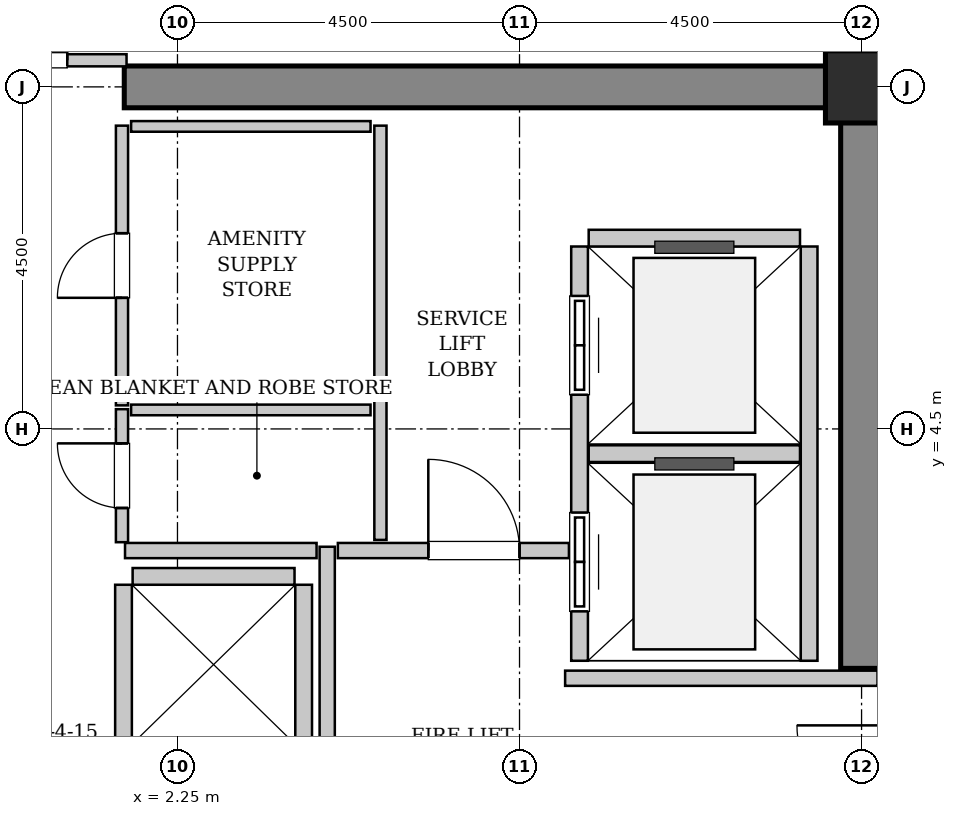
"""IFC4 building model, lengths in metres.
Left out: names, types, materials, properties, quantities, classifications, styles, units other than length and angle.
Written with IfcOpenShell. Run it as: python <this file> out.ifc"""

import sys

from ifc_helpers import new_model, si_unit, direction, frame, frame_2d, origin, origin_2d, place, context, subcontext, project, spatial, rectangle, hollow_rectangle, extrude, source, transform, mapped, element, fill, save


model = new_model("IFC4")
c1 = context("Model", 3, precision=1e-05, world=origin(), true_north=direction((0.0, 1.0)))
c2 = subcontext(c1, "Body", "Model", "MODEL_VIEW")
j1 = project(units=[si_unit("LENGTHUNIT", "METRE"), si_unit("PLANEANGLEUNIT", "RADIAN")], contexts=[c1])
p1 = place(None, origin())
s1 = spatial("IfcSite", under=j1, at=p1, CompositionType="ELEMENT")
p2 = place(p1, origin())
s2 = spatial("IfcBuilding", under=s1, at=p2, CompositionType="ELEMENT")
p3 = place(p2, frame((0.0, 0.0, 167.8)))
s3 = spatial("IfcBuildingStorey", under=s2, at=p3, CompositionType="ELEMENT", Elevation=167.8)
m1 = source(origin(), c2, "Body", "SweptSolid", [
    extrude(rectangle(XDim=9.975, YDim=0.55, at=frame_2d((4.987, 0.0))), origin(), (0.0, 0.0, 1.0), 3.8),
])
p4 = place(p3, frame((1.55, 9.0, 0.0), z_axis=(0.0, 0.0, 1.0), x_axis=(1.0, 0.0, 0.0)))
e1 = element("IfcWall", 1, at=p4, inside=s3, PredefinedType="SHEAR", context=c2, shape_type="MappedRepresentation", body=[
    mapped(m1, transform((0.0, 0.0, 0.0), x_axis=(1.0, 0.0, 0.0), y_axis=(0.0, 1.0, 0.0), z_axis=(0.0, 0.0, 1.0), scale=1.0)),
])
m2 = source(origin(), c2, "Body", "SweptSolid", [
    extrude(rectangle(XDim=7.375, YDim=0.55, at=frame_2d((3.688, 0.0))), origin(), (0.0, 0.0, 1.0), 3.8),
])
p5 = place(p3, frame((11.25, 1.35, 0.0), z_axis=(0.0, 0.0, 1.0), x_axis=(0.0, 1.0, 0.0)))
e2 = element("IfcWall", 2, at=p5, inside=s3, PredefinedType="SHEAR", context=c2, shape_type="MappedRepresentation", body=[
    mapped(m2, transform((0.0, 0.0, 0.0), x_axis=(1.0, 0.0, 0.0), y_axis=(0.0, 1.0, 0.0), z_axis=(0.0, 0.0, 1.0), scale=1.0)),
])
m3 = source(origin(), c2, "Body", "SweptSolid", [
    extrude(hollow_rectangle(XDim=0.95, YDim=0.95, WallThickness=0.045, InnerFilletRadius=0.045, OuterFilletRadius=0.09, at=origin_2d()), origin(), (0.0, 0.0, 1.0), 3.8),
])
p6 = place(p3, frame((11.25, 9.0, 0.0), z_axis=(0.0, 0.0, 1.0), x_axis=(1.0, 0.0, 0.0)))
e3 = element("IfcColumn", 3, at=p6, inside=s3, PredefinedType="COLUMN", context=c2, shape_type="MappedRepresentation", body=[
    mapped(m3, transform((0.0, 0.0, 0.0), x_axis=(1.0, 0.0, 0.0), y_axis=(0.0, 1.0, 0.0), z_axis=(0.0, 0.0, 1.0), scale=1.0)),
])
m4 = source(origin(), c2, "Body", "SweptSolid", [
    extrude(rectangle(XDim=5.45, YDim=0.22, at=frame_2d((2.725, 0.0))), origin(), (0.0, 0.0, 1.0), 3.535),
])
p7 = place(p3, frame((7.54, 6.9, 0.0), z_axis=(0.0, 0.0, 1.0), x_axis=(0.0, -1.0, 0.0)))
e4 = element("IfcWall", 4, at=p7, inside=s3, PredefinedType="SOLIDWALL", context=c2, shape_type="MappedRepresentation", body=[
    mapped(m4, transform((0.0, 0.0, 0.0), x_axis=(1.0, 0.0, 0.0), y_axis=(0.0, 1.0, 0.0), z_axis=(0.0, 0.0, 1.0), scale=1.0)),
])
p8 = place(p7, frame((3.5, 0.0, 0.0)))
e5 = element("IfcOpeningElement", 5, at=p8, cuts=e4, PredefinedType="OPENING", context=c2, shape_type="SweptSolid", body=[
    extrude(rectangle(XDim=1.3, YDim=2.3, at=frame_2d((0.65, 1.15))), frame((0.0, 0.12, 0.0), z_axis=(0.0, -1.0, 0.0), x_axis=(1.0, 0.0, 0.0)), (0.0, 0.0, 1.0), 0.24),
])
p9 = place(p7, frame((0.65, 0.0, 0.0)))
e6 = element("IfcOpeningElement", 6, at=p9, cuts=e4, PredefinedType="OPENING", context=c2, shape_type="SweptSolid", body=[
    extrude(rectangle(XDim=1.3, YDim=2.3, at=frame_2d((0.65, 1.15))), frame((0.0, 0.12, 0.0), z_axis=(0.0, -1.0, 0.0), x_axis=(1.0, 0.0, 0.0)), (0.0, 0.0, 1.0), 0.24),
])
p10 = place(p3, frame((10.56, 1.45, 0.0), z_axis=(0.0, 0.0, 1.0), x_axis=(0.0, 1.0, 0.0)))
e7 = element("IfcWall", 7, at=p10, inside=s3, PredefinedType="SOLIDWALL", context=c2, shape_type="MappedRepresentation", body=[
    mapped(m4, transform((0.0, 0.0, 0.0), x_axis=(1.0, 0.0, 0.0), y_axis=(0.0, 1.0, 0.0), z_axis=(0.0, 0.0, 1.0), scale=1.0)),
])
m5 = source(origin(), c2, "Body", "SweptSolid", [
    extrude(rectangle(XDim=2.78, YDim=0.22, at=frame_2d((1.39, 0.0))), origin(), (0.0, 0.0, 1.0), 3.535),
])
for number, where, z_axis, x_axis in (
    (8, (7.66, 4.175, 0.0), (0.0, 0.0, 1.0), (1.0, 0.0, 0.0)),
    (9, (10.44, 7.01, 0.0), (0.0, 0.0, 1.0), (-1.0, 0.0, 0.0)),
):
    element("IfcWall", number, at=place(p3, frame(where, z_axis=z_axis, x_axis=x_axis)), inside=s3, PredefinedType="SOLIDWALL", context=c2, shape_type="MappedRepresentation", body=[
        mapped(m5, transform((0.0, 0.0, 0.0), x_axis=(1.0, 0.0, 0.0), y_axis=(0.0, 1.0, 0.0), z_axis=(0.0, 0.0, 1.0), scale=1.0)),
    ])
m6 = source(origin(), c2, "Body", "SweptSolid", [
    extrude(rectangle(XDim=4.9, YDim=0.22, at=frame_2d((2.45, 0.0))), origin(), (0.0, 0.0, 1.0), 3.535),
])
for number, where, z_axis, x_axis in (
    (10, (1.54, 2.45, 0.0), (0.0, 0.0, 1.0), (0.0, -1.0, 0.0)),
    (11, (3.91, -2.45, 0.0), (0.0, 0.0, 1.0), (0.0, 1.0, 0.0)),
):
    element("IfcWall", number, at=place(p3, frame(where, z_axis=z_axis, x_axis=x_axis)), inside=s3, PredefinedType="SOLIDWALL", context=c2, shape_type="MappedRepresentation", body=[
        mapped(m6, transform((0.0, 0.0, 0.0), x_axis=(1.0, 0.0, 0.0), y_axis=(0.0, 1.0, 0.0), z_axis=(0.0, 0.0, 1.0), scale=1.0)),
    ])
m7 = source(origin(), c2, "Body", "SweptSolid", [
    extrude(rectangle(XDim=2.13, YDim=0.22, at=frame_2d((1.065, 0.0))), origin(), (0.0, 0.0, 1.0), 3.535),
])
p11 = place(p3, frame((3.79, 2.56, 0.0), z_axis=(0.0, 0.0, 1.0), x_axis=(-1.0, 0.0, 0.0)))
e12 = element("IfcWall", 12, at=p11, inside=s3, PredefinedType="SOLIDWALL", context=c2, shape_type="MappedRepresentation", body=[
    mapped(m7, transform((0.0, 0.0, 0.0), x_axis=(1.0, 0.0, 0.0), y_axis=(0.0, 1.0, 0.0), z_axis=(0.0, 0.0, 1.0), scale=1.0)),
])
m8 = source(origin(), c2, "Body", "SweptSolid", [
    extrude(rectangle(XDim=5.9, YDim=0.2, at=frame_2d((2.95, 0.0))), origin(), (0.0, 0.0, 1.0), 3.535),
])
p12 = place(p3, frame((4.22, -2.95, 0.0), z_axis=(0.0, 0.0, 1.0), x_axis=(0.0, 1.0, 0.0)))
e13 = element("IfcWall", 13, at=p12, inside=s3, PredefinedType="PARTITIONING", context=c2, shape_type="MappedRepresentation", body=[
    mapped(m8, transform((0.0, 0.0, 0.0), x_axis=(1.0, 0.0, 0.0), y_axis=(0.0, 1.0, 0.0), z_axis=(0.0, 0.0, 1.0), scale=1.0)),
])
m9 = source(origin(), c2, "Body", "SweptSolid", [
    extrude(rectangle(XDim=2.52, YDim=0.2, at=frame_2d((1.26, 0.0))), origin(), (0.0, 0.0, 1.0), 3.535),
])
p13 = place(p3, frame((1.56, 2.9, 0.0), z_axis=(0.0, 0.0, 1.0), x_axis=(1.0, 0.0, 0.0)))
e14 = element("IfcWall", 14, at=p13, inside=s3, PredefinedType="PARTITIONING", context=c2, shape_type="MappedRepresentation", body=[
    mapped(m9, transform((0.0, 0.0, 0.0), x_axis=(1.0, 0.0, 0.0), y_axis=(0.0, 1.0, 0.0), z_axis=(0.0, 0.0, 1.0), scale=1.0)),
])
m10 = source(origin(), c2, "Body", "SweptSolid", [
    extrude(rectangle(XDim=3.04, YDim=0.2, at=frame_2d((1.52, 0.0))), origin(), (0.0, 0.0, 1.0), 3.535),
])
p14 = place(p3, frame((4.36, 2.9, 0.0), z_axis=(0.0, 0.0, 1.0), x_axis=(1.0, 0.0, 0.0)))
e15 = element("IfcWall", 15, at=p14, inside=s3, PredefinedType="PARTITIONING", context=c2, shape_type="MappedRepresentation", body=[
    mapped(m10, transform((0.0, 0.0, 0.0), x_axis=(1.0, 0.0, 0.0), y_axis=(0.0, 1.0, 0.0), z_axis=(0.0, 0.0, 1.0), scale=1.0)),
])
p15 = place(p14, frame((1.19, 0.0, 0.0)))
e16 = element("IfcOpeningElement", 16, at=p15, cuts=e15, PredefinedType="OPENING", context=c2, shape_type="SweptSolid", body=[
    extrude(rectangle(XDim=1.2, YDim=2.15, at=frame_2d((0.6, 1.075))), frame((0.0, 0.11, 0.0), z_axis=(0.0, -1.0, 0.0), x_axis=(1.0, 0.0, 0.0)), (0.0, 0.0, 1.0), 0.22),
])
m11 = source(origin(), c2, "Body", "SweptSolid", [
    extrude(rectangle(XDim=4.11, YDim=0.2, at=frame_2d((2.055, 0.0))), origin(), (0.0, 0.0, 1.0), 3.535),
])
p16 = place(p3, frame((7.35, 1.22, 0.0), z_axis=(0.0, 0.0, 1.0), x_axis=(1.0, 0.0, 0.0)))
e17 = element("IfcWall", 17, at=p16, inside=s3, PredefinedType="PARTITIONING", context=c2, shape_type="MappedRepresentation", body=[
    mapped(m11, transform((0.0, 0.0, 0.0), x_axis=(1.0, 0.0, 0.0), y_axis=(0.0, 1.0, 0.0), z_axis=(0.0, 0.0, 1.0), scale=1.0)),
])
m12 = source(origin(), c2, "Body", "SweptSolid", [
    extrude(rectangle(XDim=3.16, YDim=0.16, at=frame_2d((1.58, 0.0))), origin(), (0.0, 0.0, 1.0), 2.425),
])
p17 = place(p3, frame((-1.58, 9.35, 0.0), z_axis=(0.0, 0.0, 1.0), x_axis=(1.0, 0.0, 0.0)))
e18 = element("IfcWall", 18, at=p17, inside=s3, PredefinedType="PARTITIONING", context=c2, shape_type="MappedRepresentation", body=[
    mapped(m12, transform((0.0, 0.0, 0.0), x_axis=(1.0, 0.0, 0.0), y_axis=(0.0, 1.0, 0.0), z_axis=(0.0, 0.0, 1.0), scale=1.0)),
])
p18 = place(p17, frame((0.78, 0.0, 0.0)))
e19 = element("IfcOpeningElement", 19, at=p18, cuts=e18, PredefinedType="OPENING", context=c2, shape_type="SweptSolid", body=[
    extrude(rectangle(XDim=1.6, YDim=2.3, at=frame_2d((0.8, 1.15))), frame((0.0, 0.09, 0.0), z_axis=(0.0, -1.0, 0.0), x_axis=(1.0, 0.0, 0.0)), (0.0, 0.0, 1.0), 0.18),
])
m13 = source(origin(), c2, "Body", "SweptSolid", [
    extrude(rectangle(XDim=5.45, YDim=0.16, at=frame_2d((2.725, 0.0))), origin(), (0.0, 0.0, 1.0), 3.535),
])
p19 = place(p3, frame((4.92, 3.04, 0.0), z_axis=(0.0, 0.0, 1.0), x_axis=(0.0, 1.0, 0.0)))
e20 = element("IfcWall", 20, at=p19, inside=s3, PredefinedType="PARTITIONING", context=c2, shape_type="MappedRepresentation", body=[
    mapped(m13, transform((0.0, 0.0, 0.0), x_axis=(1.0, 0.0, 0.0), y_axis=(0.0, 1.0, 0.0), z_axis=(0.0, 0.0, 1.0), scale=1.0)),
])
m14 = source(origin(), c2, "Body", "SweptSolid", [
    extrude(rectangle(XDim=1.75, YDim=0.16, at=frame_2d((0.875, 0.0))), origin(), (0.0, 0.0, 1.0), 3.535),
])
p20 = place(p3, frame((1.52, 3.01, 0.0), z_axis=(0.0, 0.0, 1.0), x_axis=(0.0, 1.0, 0.0)))
e21 = element("IfcWall", 21, at=p20, inside=s3, PredefinedType="PARTITIONING", context=c2, shape_type="MappedRepresentation", body=[
    mapped(m14, transform((0.0, 0.0, 0.0), x_axis=(1.0, 0.0, 0.0), y_axis=(0.0, 1.0, 0.0), z_axis=(0.0, 0.0, 1.0), scale=1.0)),
])
p21 = place(p20, frame((0.45, 0.0, 0.0)))
e22 = element("IfcOpeningElement", 22, at=p21, cuts=e21, PredefinedType="OPENING", context=c2, shape_type="SweptSolid", body=[
    extrude(rectangle(XDim=0.85, YDim=2.1, at=frame_2d((0.425, 1.05))), frame((0.0, 0.09, 0.0), z_axis=(0.0, -1.0, 0.0), x_axis=(1.0, 0.0, 0.0)), (0.0, 0.0, 1.0), 0.18),
])
m15 = source(origin(), c2, "Body", "SweptSolid", [
    extrude(rectangle(XDim=3.15, YDim=0.14, at=frame_2d((1.575, 0.0))), origin(), (0.0, 0.0, 1.0), 3.535),
])
p22 = place(p3, frame((1.64, 4.75, 0.0), z_axis=(0.0, 0.0, 1.0), x_axis=(1.0, 0.0, 0.0)))
e23 = element("IfcWall", 23, at=p22, inside=s3, PredefinedType="PARTITIONING", context=c2, shape_type="MappedRepresentation", body=[
    mapped(m15, transform((0.0, 0.0, 0.0), x_axis=(1.0, 0.0, 0.0), y_axis=(0.0, 1.0, 0.0), z_axis=(0.0, 0.0, 1.0), scale=1.0)),
])
m16 = source(origin(), c2, "Body", "SweptSolid", [
    extrude(rectangle(XDim=3.68, YDim=0.16, at=frame_2d((1.84, 0.0))), origin(), (0.0, 0.0, 1.0), 3.535),
])
p23 = place(p3, frame((1.52, 4.81, 0.0), z_axis=(0.0, 0.0, 1.0), x_axis=(0.0, 1.0, 0.0)))
e24 = element("IfcWall", 24, at=p23, inside=s3, PredefinedType="PARTITIONING", context=c2, shape_type="MappedRepresentation", body=[
    mapped(m16, transform((0.0, 0.0, 0.0), x_axis=(1.0, 0.0, 0.0), y_axis=(0.0, 1.0, 0.0), z_axis=(0.0, 0.0, 1.0), scale=1.0)),
])
p24 = place(p23, frame((1.415, 0.0, 0.0)))
e25 = element("IfcOpeningElement", 25, at=p24, cuts=e24, PredefinedType="OPENING", context=c2, shape_type="SweptSolid", body=[
    extrude(rectangle(XDim=0.85, YDim=2.1, at=frame_2d((0.425, 1.05))), frame((0.0, 0.09, 0.0), z_axis=(0.0, -1.0, 0.0), x_axis=(1.0, 0.0, 0.0)), (0.0, 0.0, 1.0), 0.18),
])
p25 = place(p3, frame((1.64, 8.48, 0.0), z_axis=(0.0, 0.0, 1.0), x_axis=(1.0, 0.0, 0.0)))
e26 = element("IfcWall", 26, at=p25, inside=s3, PredefinedType="PARTITIONING", context=c2, shape_type="MappedRepresentation", body=[
    mapped(m15, transform((0.0, 0.0, 0.0), x_axis=(1.0, 0.0, 0.0), y_axis=(0.0, 1.0, 0.0), z_axis=(0.0, 0.0, 1.0), scale=1.0)),
])
m17 = source(origin(), c2, "Body", "SweptSolid", [
    extrude(rectangle(XDim=1.3, YDim=2.3, at=frame_2d((0.65, 1.15))), frame((0.0, 0.025, 0.0), z_axis=(0.0, -1.0, 0.0), x_axis=(1.0, 0.0, 0.0)), (0.0, 0.0, 1.0), 0.05),
])
p26 = place(p8, origin())
e27 = element("IfcDoor", 27, at=p26, inside=s3, OperationType="SLIDING_TO_RIGHT", PredefinedType="DOOR", context=c2, shape_type="MappedRepresentation", body=[
    mapped(m17, transform((0.0, 0.0, 0.0), x_axis=(1.0, 0.0, 0.0), y_axis=(0.0, 1.0, 0.0), z_axis=(0.0, 0.0, 1.0), scale=1.0)),
])
fill(e5, e27)
p27 = place(p9, origin())
e28 = element("IfcDoor", 28, at=p27, inside=s3, OperationType="SLIDING_TO_RIGHT", PredefinedType="DOOR", context=c2, shape_type="MappedRepresentation", body=[
    mapped(m17, transform((0.0, 0.0, 0.0), x_axis=(1.0, 0.0, 0.0), y_axis=(0.0, 1.0, 0.0), z_axis=(0.0, 0.0, 1.0), scale=1.0)),
])
fill(e6, e28)
m18 = source(origin(), c2, "Body", "SweptSolid", [
    extrude(rectangle(XDim=1.2, YDim=2.15, at=frame_2d((0.6, 1.075))), frame((0.0, 0.025, 0.0), z_axis=(0.0, -1.0, 0.0), x_axis=(1.0, 0.0, 0.0)), (0.0, 0.0, 1.0), 0.05),
])
p28 = place(p15, origin())
e29 = element("IfcDoor", 29, at=p28, inside=s3, OperationType="SINGLE_SWING_LEFT", PredefinedType="DOOR", context=c2, shape_type="MappedRepresentation", body=[
    mapped(m18, transform((0.0, 0.0, 0.0), x_axis=(1.0, 0.0, 0.0), y_axis=(0.0, 1.0, 0.0), z_axis=(0.0, 0.0, 1.0), scale=1.0)),
])
fill(e16, e29)
m19 = source(origin(), c2, "Body", "SweptSolid", [
    extrude(rectangle(XDim=1.6, YDim=2.3, at=frame_2d((0.8, 1.15))), frame((0.0, 0.025, 0.0), z_axis=(0.0, -1.0, 0.0), x_axis=(1.0, 0.0, 0.0)), (0.0, 0.0, 1.0), 0.05),
])
p29 = place(p18, origin())
e30 = element("IfcDoor", 30, at=p29, inside=s3, OperationType="DOUBLE_DOOR_SINGLE_SWING", PredefinedType="DOOR", context=c2, shape_type="MappedRepresentation", body=[
    mapped(m19, transform((0.0, 0.0, 0.0), x_axis=(1.0, 0.0, 0.0), y_axis=(0.0, 1.0, 0.0), z_axis=(0.0, 0.0, 1.0), scale=1.0)),
])
fill(e19, e30)
m20 = source(origin(), c2, "Body", "SweptSolid", [
    extrude(rectangle(XDim=0.85, YDim=2.1, at=frame_2d((0.425, 1.05))), frame((0.0, 0.025, 0.0), z_axis=(0.0, -1.0, 0.0), x_axis=(1.0, 0.0, 0.0)), (0.0, 0.0, 1.0), 0.05),
])
p30 = place(p21, origin())
e31 = element("IfcDoor", 31, at=p30, inside=s3, OperationType="SINGLE_SWING_RIGHT", PredefinedType="DOOR", context=c2, shape_type="MappedRepresentation", body=[
    mapped(m20, transform((0.0, 0.0, 0.0), x_axis=(1.0, 0.0, 0.0), y_axis=(0.0, 1.0, 0.0), z_axis=(0.0, 0.0, 1.0), scale=1.0)),
])
fill(e22, e31)
p31 = place(p24, origin())
e32 = element("IfcDoor", 32, at=p31, inside=s3, OperationType="SINGLE_SWING_LEFT", PredefinedType="DOOR", context=c2, shape_type="MappedRepresentation", body=[
    mapped(m20, transform((0.0, 0.0, 0.0), x_axis=(1.0, 0.0, 0.0), y_axis=(0.0, 1.0, 0.0), z_axis=(0.0, 0.0, 1.0), scale=1.0)),
])
fill(e25, e32)
save(model, sys.argv[1])
